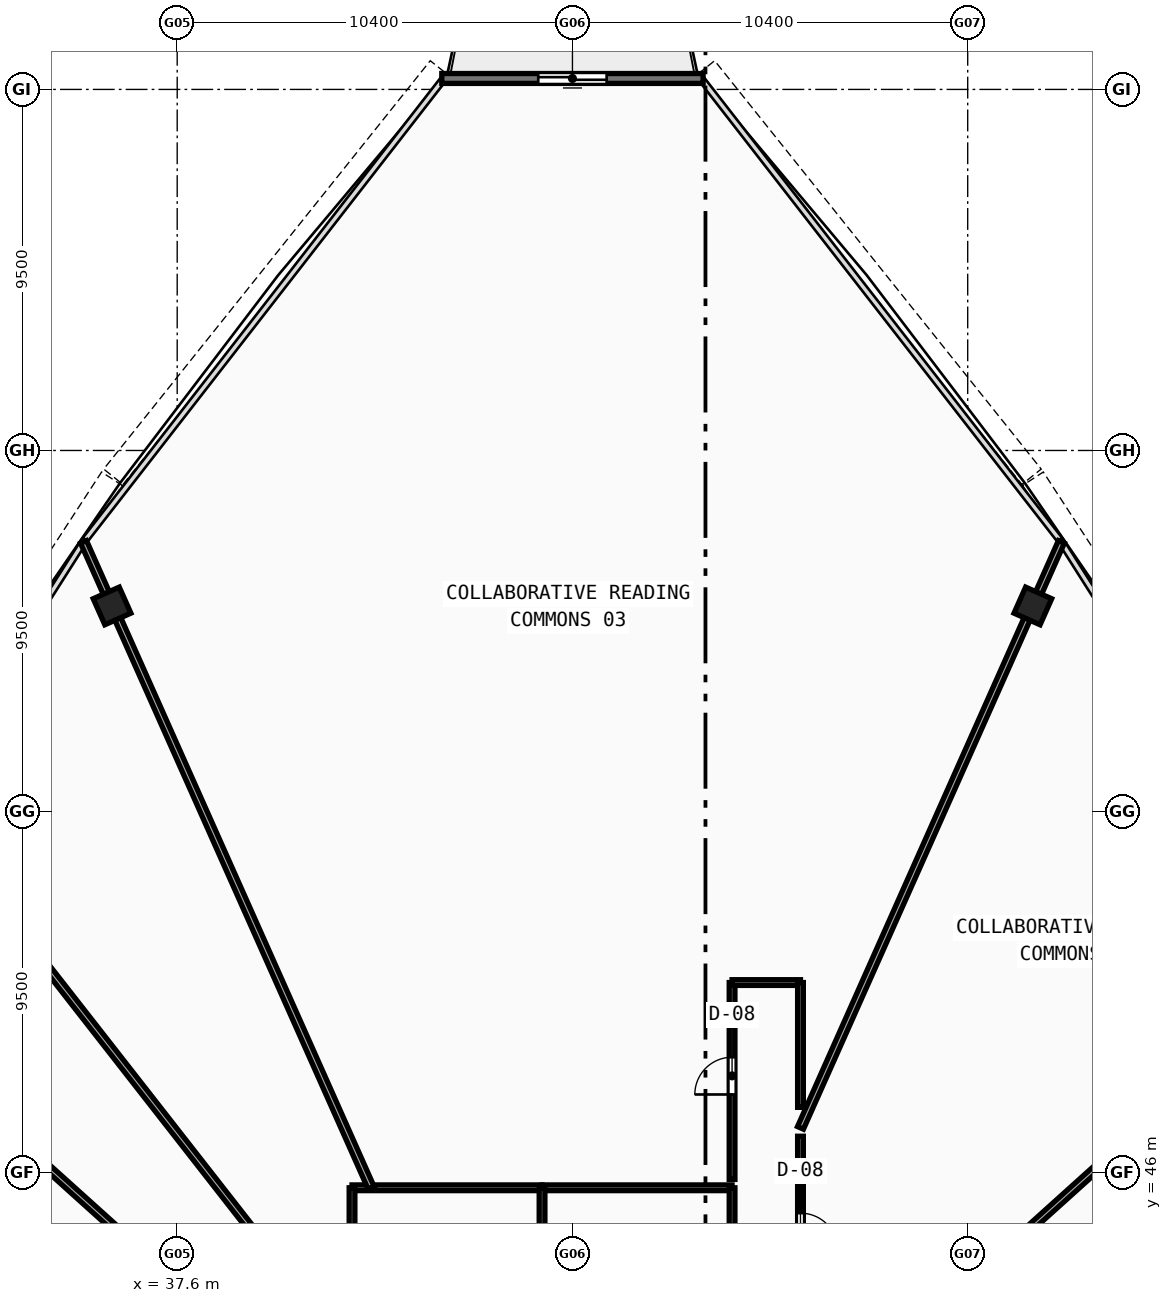
"""IFC4 building model, lengths in metres.
Left out: names, types, materials, properties, quantities, classifications, styles, units other than length and angle.
Written with IfcOpenShell. Run it as: python <this file> out.ifc"""

import sys

from ifc_helpers import new_model, si_unit, direction, frame, frame_2d, origin, origin_with_axes, origin_2d, place, context, subcontext, project, spatial, rectangle, hollow_rectangle, extrude, source, transform, mapped, element, fill, save


model = new_model("IFC4")
c1 = context("Model", 3, precision=1e-05, world=origin(), true_north=direction((0.0, 1.0)))
c2 = subcontext(c1, "Body", "Model", "MODEL_VIEW")
j1 = project(units=[si_unit("LENGTHUNIT", "METRE"), si_unit("PLANEANGLEUNIT", "RADIAN")], contexts=[c1])
p1 = place(None, origin())
s1 = spatial("IfcSite", under=j1, at=p1, CompositionType="ELEMENT")
p2 = place(p1, origin())
s2 = spatial("IfcBuilding", under=s1, at=p2, CompositionType="ELEMENT")
p3 = place(p2, frame((0.0, 0.0, 307.4)))
s3 = spatial("IfcBuildingStorey", under=s2, at=p3, CompositionType="ELEMENT", Elevation=307.4)
m1 = source(origin(), c2, "Body", "SweptSolid", [
    extrude(hollow_rectangle(XDim=0.75, YDim=0.75, WallThickness=0.028, at=origin_2d()), origin(), (0.0, 0.0, 1.0), 3.73),
])
for number, where, z_axis, x_axis in (
    (1, (60.114, 60.909, -0.26), (0.0, 0.0, 1.0), (-0.914, 0.407, 0.0)),
    (2, (35.886, 60.909, -0.26), (0.0, 0.0, 1.0), (-0.914, -0.407, 0.0)),
):
    element("IfcColumn", number, at=place(p3, frame(where, z_axis=z_axis, x_axis=x_axis)), inside=s3, PredefinedType="COLUMN", context=c2, shape_type="MappedRepresentation", body=[
        mapped(m1, transform((0.0, 0.0, 0.0), scale=1.0)),
    ])
p4 = place(p3, frame((51.438, 74.788, 0.0), z_axis=(0.0, 0.0, 1.0), x_axis=(-1.0, 0.0, 0.0)))
e3 = element("IfcWall", 3, at=p4, inside=s3, PredefinedType="STANDARD", context=c2, shape_type="SweptSolid", body=[
    extrude(rectangle(XDim=6.875, YDim=0.26, at=frame_2d((3.438, 0.0))), origin(), (0.0, 0.0, 1.0), 3.47),
])
p5 = place(p4, frame((2.538, 0.0, 0.0)))
e4 = element("IfcOpeningElement", 4, at=p5, cuts=e3, PredefinedType="OPENING", context=c2, shape_type="SweptSolid", body=[
    extrude(rectangle(XDim=1.8, YDim=2.15, at=frame_2d((0.9, 1.075))), frame((0.0, 0.14, 0.0), z_axis=(0.0, -1.0, 0.0), x_axis=(1.0, 0.0, 0.0)), (0.0, 0.0, 1.0), 0.28),
])
p6 = place(p3, frame((42.2, 45.6, 0.0), z_axis=(0.0, 0.0, 1.0), x_axis=(1.0, 0.0, 0.0)))
e5 = element("IfcWall", 5, at=p6, inside=s3, PredefinedType="PARTITIONING", context=c2, shape_type="SweptSolid", body=[
    extrude(rectangle(XDim=5.0, YDim=0.15, at=frame_2d((2.5, 0.0))), origin(), (0.0, 0.0, 1.0), 2.87),
])
p7 = place(p3, frame((42.2, 42.2, 0.0), z_axis=(0.0, 0.0, 1.0), x_axis=(0.0, 1.0, 0.0)))
e6 = element("IfcWall", 6, at=p7, inside=s3, PredefinedType="PARTITIONING", context=c2, shape_type="SweptSolid", body=[
    extrude(rectangle(XDim=3.4, YDim=0.15, at=frame_2d((1.7, 0.0))), origin(), (0.0, 0.0, 1.0), 3.47),
])
p8 = place(p3, frame((47.2, 45.6, 0.0), z_axis=(0.0, 0.0, 1.0), x_axis=(1.0, 0.0, 0.0)))
e7 = element("IfcWall", 7, at=p8, inside=s3, PredefinedType="PARTITIONING", context=c2, shape_type="SweptSolid", body=[
    extrude(rectangle(XDim=5.0, YDim=0.15, at=frame_2d((2.5, 0.0))), origin(), (0.0, 0.0, 1.0), 3.47),
])
p9 = place(p3, frame((47.2, 42.2, 0.0), z_axis=(0.0, 0.0, 1.0), x_axis=(0.0, 1.0, 0.0)))
e8 = element("IfcWall", 8, at=p9, inside=s3, PredefinedType="PARTITIONING", context=c2, shape_type="SweptSolid", body=[
    extrude(rectangle(XDim=3.4, YDim=0.15, at=frame_2d((1.7, 0.0))), origin(), (0.0, 0.0, 1.0), 3.47),
])
p10 = place(p3, frame((52.2, 42.2, 0.0), z_axis=(0.0, 0.0, 1.0), x_axis=(0.0, 1.0, 0.0)))
e9 = element("IfcWall", 9, at=p10, inside=s3, PredefinedType="PARTITIONING", context=c2, shape_type="SweptSolid", body=[
    extrude(rectangle(XDim=3.4, YDim=0.15, at=frame_2d((1.7, 0.0))), origin(), (0.0, 0.0, 1.0), 2.87),
])
p11 = place(p3, frame((57.44, 42.2, 0.0), z_axis=(0.0, 0.0, 1.0), x_axis=(0.74314439151, 0.669131088329, 0.0)))
e10 = element("IfcWall", 10, at=p11, inside=s3, PredefinedType="PARTITIONING", context=c2, shape_type="SweptSolid", body=[
    extrude(rectangle(XDim=14.026, YDim=0.17, at=frame_2d((7.013, 0.0))), origin(), (0.0, 0.0, 1.0), 2.87),
])
p12 = place(p3, frame((54.0, 47.176, 0.0), z_axis=(0.0, 0.0, 1.0), x_axis=(0.406741029061, 0.913543504863, 0.0)))
e11 = element("IfcWall", 11, at=p12, inside=s3, PredefinedType="PARTITIONING", context=c2, shape_type="SweptSolid", body=[
    extrude(rectangle(XDim=16.877, YDim=0.17, at=frame_2d((8.438, 0.0))), origin(), (0.0, 0.0, 1.0), 2.87),
])
p13 = place(p3, frame((42.702, 45.6, 0.0), z_axis=(0.0, 0.0, 1.0), x_axis=(-0.406747233578, 0.913540742374, 0.0)))
e12 = element("IfcWall", 12, at=p13, inside=s3, PredefinedType="PARTITIONING", context=c2, shape_type="SweptSolid", body=[
    extrude(rectangle(XDim=18.602, YDim=0.17, at=frame_2d((9.301, 0.0))), origin(), (0.0, 0.0, 1.0), 2.87),
])
p14 = place(p3, frame((41.359, 42.2, 0.0), z_axis=(0.0, 0.0, 1.0), x_axis=(-0.615656448173, 0.788014681223, 0.0)))
e13 = element("IfcWall", 13, at=p14, inside=s3, PredefinedType="PARTITIONING", context=c2, shape_type="SweptSolid", body=[
    extrude(rectangle(XDim=17.185, YDim=0.17, at=frame_2d((8.592, 0.0))), origin(), (0.0, 0.0, 1.0), 2.87),
])
p15 = place(p3, frame((38.56, 42.2, 0.0), z_axis=(0.0, 0.0, 1.0), x_axis=(-0.74314439151, 0.669131088329, 0.0)))
e14 = element("IfcWall", 14, at=p15, inside=s3, PredefinedType="PARTITIONING", context=c2, shape_type="SweptSolid", body=[
    extrude(rectangle(XDim=14.026, YDim=0.17, at=frame_2d((7.013, 0.0))), origin(), (0.0, 0.0, 1.0), 2.87),
])
p16 = place(p3, frame((52.2, 45.82, 0.0), z_axis=(0.0, 0.0, 1.0), x_axis=(0.0, 1.0, 0.0)))
e15 = element("IfcWall", 15, at=p16, inside=s3, PredefinedType="PARTITIONING", context=c2, shape_type="SweptSolid", body=[
    extrude(rectangle(XDim=5.18, YDim=0.15, at=frame_2d((2.59, 0.0))), origin(), (0.0, 0.0, 1.0), 3.12),
])
p17 = place(p16, frame((2.235, 0.0, 0.0)))
e16 = element("IfcOpeningElement", 16, at=p17, cuts=e15, PredefinedType="OPENING", context=c2, shape_type="SweptSolid", body=[
    extrude(rectangle(XDim=0.98, YDim=2.12, at=frame_2d((0.49, 1.06))), frame((0.0, 0.085, 0.0), z_axis=(0.0, -1.0, 0.0), x_axis=(1.0, 0.0, 0.0)), (0.0, 0.0, 1.0), 0.17),
])
p18 = place(p3, frame((52.2, 51.0, 0.0), z_axis=(0.0, 0.0, 1.0), x_axis=(1.0, 0.0, 0.0)))
e17 = element("IfcWall", 17, at=p18, inside=s3, PredefinedType="PARTITIONING", context=c2, shape_type="SweptSolid", body=[
    extrude(rectangle(XDim=1.8, YDim=0.15, at=frame_2d((0.9, 0.0))), origin(), (0.0, 0.0, 1.0), 3.47),
])
p19 = place(p3, frame((54.0, 51.0, 0.0), z_axis=(0.0, 0.0, 1.0), x_axis=(0.0, -1.0, 0.0)))
e18 = element("IfcWall", 18, at=p19, inside=s3, PredefinedType="PARTITIONING", context=c2, shape_type="SweptSolid", body=[
    extrude(rectangle(XDim=3.283, YDim=0.15, at=frame_2d((1.642, 0.0))), origin(), (0.0, 0.0, 1.0), 3.12),
])
p20 = place(p3, frame((54.0, 46.956, 0.0), z_axis=(0.0, 0.0, 1.0), x_axis=(0.0, -1.0, 0.0)))
e19 = element("IfcWall", 19, at=p20, inside=s3, PredefinedType="PARTITIONING", context=c2, shape_type="SweptSolid", body=[
    extrude(rectangle(XDim=4.756, YDim=0.15, at=frame_2d((2.378, 0.0))), origin(), (0.0, 0.0, 1.0), 2.87),
])
p21 = place(p20, frame((2.023, 0.0, 0.0)))
e20 = element("IfcOpeningElement", 20, at=p21, cuts=e19, PredefinedType="OPENING", context=c2, shape_type="SweptSolid", body=[
    extrude(rectangle(XDim=0.98, YDim=2.12, at=frame_2d((0.49, 1.06))), frame((0.0, 0.085, 0.0), z_axis=(0.0, -1.0, 0.0), x_axis=(1.0, 0.0, 0.0)), (0.0, 0.0, 1.0), 0.17),
])
m2 = source(origin(), c2, "Body", "SweptSolid", [
    extrude(rectangle(XDim=1.8, YDim=2.15, at=frame_2d((0.9, 1.075))), frame((0.0, 0.025, 0.0), z_axis=(0.0, -1.0, 0.0), x_axis=(1.0, 0.0, 0.0)), (0.0, 0.0, 1.0), 0.05),
])
p22 = place(p5, origin_with_axes())
e21 = element("IfcDoor", 21, at=p22, inside=s3, OperationType="DOUBLE_DOOR_SLIDING", PredefinedType="DOOR", context=c2, shape_type="MappedRepresentation", body=[
    mapped(m2, transform((0.0, 0.0, 0.0), scale=1.0)),
])
fill(e4, e21)
m3 = source(origin(), c2, "Body", "SweptSolid", [
    extrude(rectangle(XDim=0.98, YDim=2.12, at=frame_2d((0.49, 1.06))), frame((0.0, 0.025, 0.0), z_axis=(0.0, -1.0, 0.0), x_axis=(1.0, 0.0, 0.0)), (0.0, 0.0, 1.0), 0.05),
])
p23 = place(p21, origin_with_axes())
e22 = element("IfcDoor", 22, at=p23, inside=s3, OperationType="SINGLE_SWING_RIGHT", PredefinedType="DOOR", context=c2, shape_type="MappedRepresentation", body=[
    mapped(m3, transform((0.0, 0.0, 0.0), scale=1.0)),
])
fill(e20, e22)
p24 = place(p17, origin_with_axes())
e23 = element("IfcDoor", 23, at=p24, inside=s3, OperationType="SINGLE_SWING_LEFT", PredefinedType="DOOR", context=c2, shape_type="MappedRepresentation", body=[
    mapped(m3, transform((0.0, 0.0, 0.0), scale=1.0)),
])
fill(e16, e23)
save(model, sys.argv[1])
